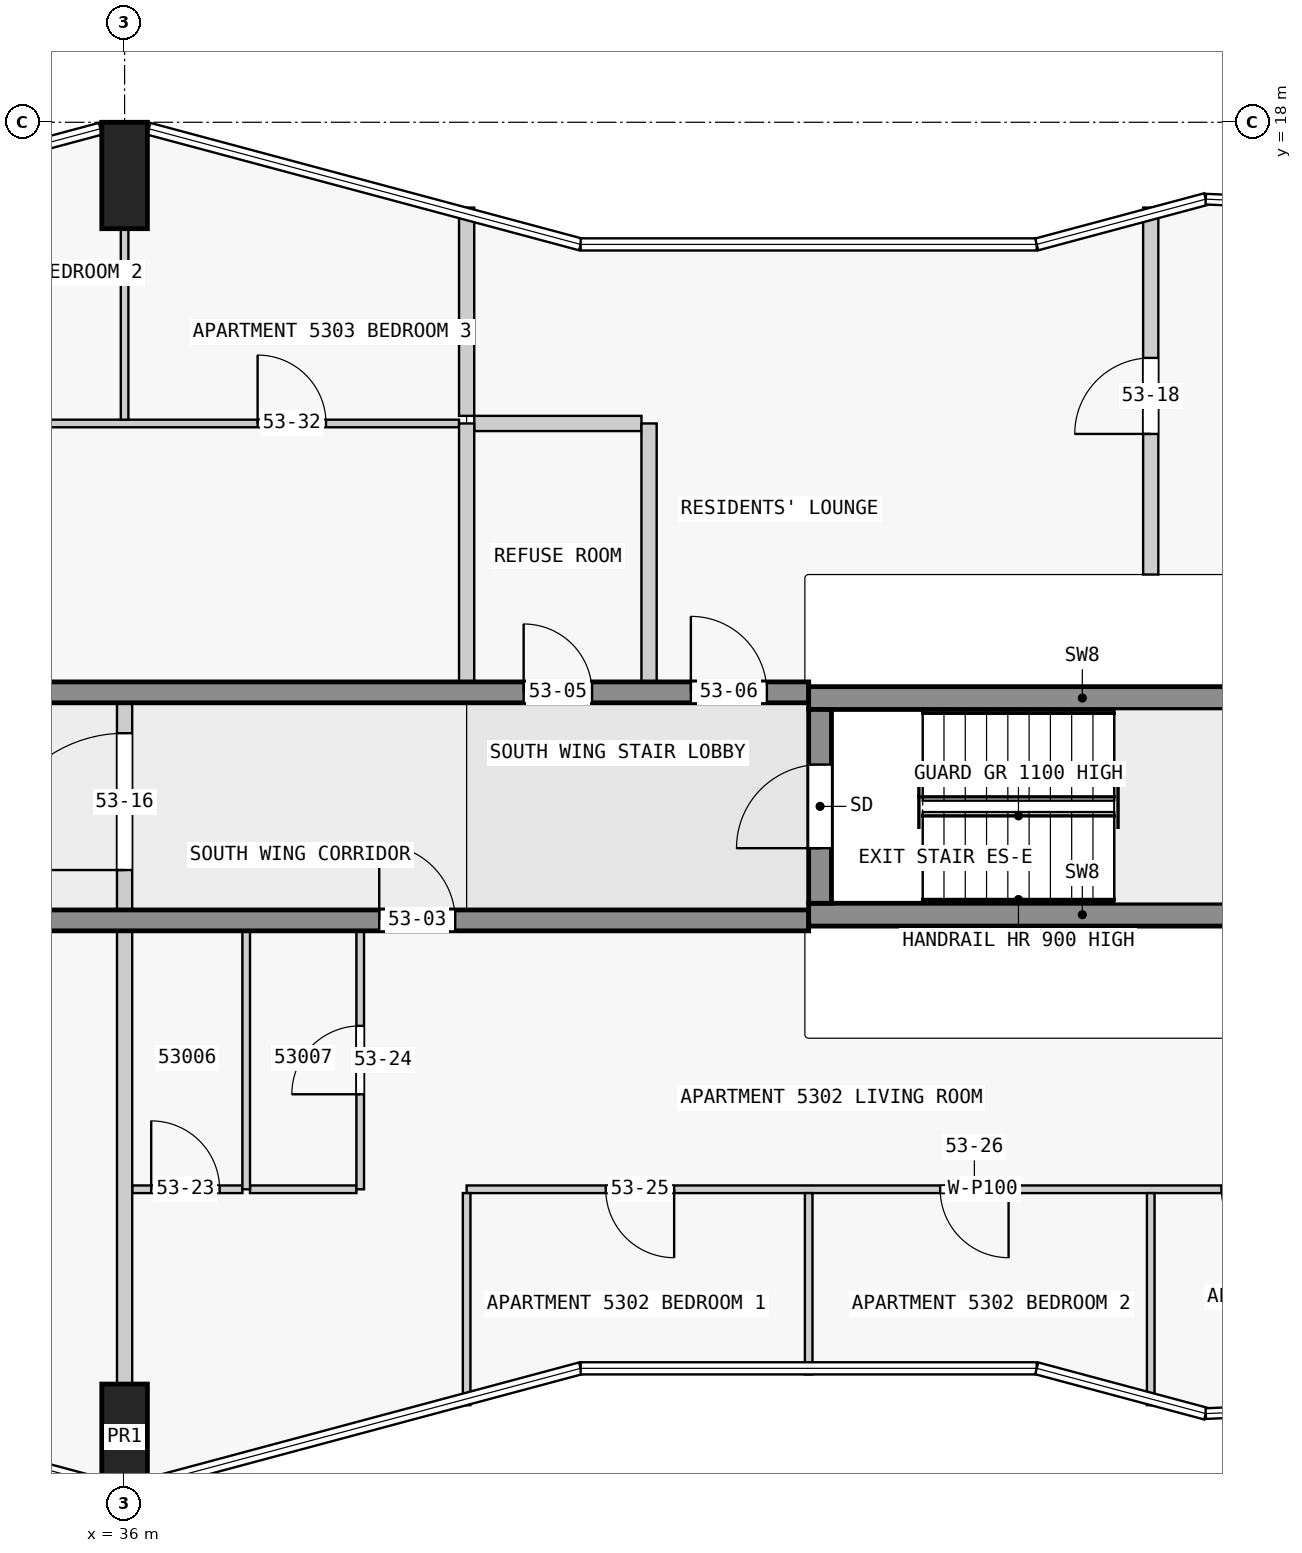
"""IFC4 building model, lengths in metres.
Left out: names, types, materials, properties, quantities, classifications, styles, units other than length and angle.
Written with IfcOpenShell. Run it as: python <this file> out.ifc"""

import sys

from ifc_helpers import new_model, si_unit, direction, frame, frame_2d, origin, origin_2d, place, context, subcontext, project, spatial, rectangle, extrude, element, fill, save


model = new_model("IFC4")
c1 = context("Model", 3, precision=1e-05, world=origin(), true_north=direction((0.0, 1.0)))
c2 = subcontext(c1, "Body", "Model", "MODEL_VIEW")
j1 = project(units=[si_unit("LENGTHUNIT", "METRE"), si_unit("PLANEANGLEUNIT", "RADIAN")], contexts=[c1])
p1 = place(None, origin())
s1 = spatial("IfcSite", under=j1, at=p1, CompositionType="ELEMENT")
p2 = place(p1, origin())
s2 = spatial("IfcBuilding", under=s1, at=p2, CompositionType="ELEMENT")
p3 = place(p2, frame((0.0, 0.0, 204.9)))
s3 = spatial("IfcBuildingStorey", under=s2, at=p3, CompositionType="ELEMENT", Elevation=204.9)
for number, where, z_axis, x_axis in (
    (1, (36.0, 0.7, 0.0), (0.0, 0.0, 1.0), (1.0, 0.0, 0.0)),
    (2, (36.0, 17.3, 0.0), (0.0, 0.0, 1.0), (1.0, 0.0, 0.0)),
):
    element("IfcColumn", number, at=place(p3, frame(where, z_axis=z_axis, x_axis=x_axis)), inside=s3, PredefinedType="COLUMN", context=c2, shape_type="SweptSolid", body=[
        extrude(rectangle(XDim=0.6, YDim=1.4, at=origin_2d()), origin(), (0.0, 0.0, 1.0), 3.5),
    ])
p4 = place(p3, frame((45.15, 7.725, 0.0), z_axis=(0.0, 0.0, 1.0), x_axis=(0.0, 1.0, 0.0)))
e3 = element("IfcWall", 3, at=p4, inside=s3, PredefinedType="SHEAR", context=c2, shape_type="SweptSolid", body=[
    extrude(rectangle(XDim=2.55, YDim=0.3, at=frame_2d((1.275, 0.0))), origin(), (0.0, 0.0, 1.0), 3.5),
])
p5 = place(p4, frame((0.725, 0.0, 0.0)))
e4 = element("IfcOpeningElement", 4, at=p5, cuts=e3, PredefinedType="OPENING", context=c2, shape_type="SweptSolid", body=[
    extrude(rectangle(XDim=1.1, YDim=2.1, at=frame_2d((0.55, 1.05))), frame((0.0, 0.16, 0.0), z_axis=(0.0, -1.0, 0.0), x_axis=(1.0, 0.0, 0.0)), (0.0, 0.0, 1.0), 0.32),
])
for number, where, z_axis, x_axis in (
    (5, (45.0, 7.575, 0.0), (0.0, 0.0, 1.0), (1.0, 0.0, 0.0)),
    (6, (45.0, 10.425, 0.0), (0.0, 0.0, 1.0), (1.0, 0.0, 0.0)),
):
    element("IfcWall", number, at=place(p3, frame(where, z_axis=z_axis, x_axis=x_axis)), inside=s3, PredefinedType="SHEAR", context=c2, shape_type="SweptSolid", body=[
        extrude(rectangle(XDim=7.2, YDim=0.3, at=frame_2d((3.6, 0.0))), origin(), (0.0, 0.0, 1.0), 3.5),
    ])
p6 = place(p3, frame((22.5, 7.5, 0.0), z_axis=(0.0, 0.0, 1.0), x_axis=(1.0, 0.0, 0.0)))
e7 = element("IfcWall", 7, at=p6, inside=s3, PredefinedType="SHEAR", context=c2, shape_type="SweptSolid", body=[
    extrude(rectangle(XDim=22.5, YDim=0.275, at=frame_2d((11.25, 0.0))), origin(), (0.0, 0.0, 1.0), 3.25),
])
p7 = place(p6, frame((4.05, 0.0, 0.0)))
e8 = element("IfcOpeningElement", 8, at=p7, cuts=e7, PredefinedType="OPENING", context=c2, shape_type="SweptSolid", body=[
    extrude(rectangle(XDim=1.0, YDim=2.1, at=frame_2d((0.5, 1.05))), frame((0.0, 0.147, 0.0), z_axis=(0.0, -1.0, 0.0), x_axis=(1.0, 0.0, 0.0)), (0.0, 0.0, 1.0), 0.295),
])
p8 = place(p6, frame((10.35, 0.0, 0.0)))
e9 = element("IfcOpeningElement", 9, at=p8, cuts=e7, PredefinedType="OPENING", context=c2, shape_type="SweptSolid", body=[
    extrude(rectangle(XDim=1.8, YDim=2.1, at=frame_2d((0.9, 1.05))), frame((0.0, 0.147, 0.0), z_axis=(0.0, -1.0, 0.0), x_axis=(1.0, 0.0, 0.0)), (0.0, 0.0, 1.0), 0.295),
])
p9 = place(p6, frame((16.85, 0.0, 0.0)))
e10 = element("IfcOpeningElement", 10, at=p9, cuts=e7, PredefinedType="OPENING", context=c2, shape_type="SweptSolid", body=[
    extrude(rectangle(XDim=1.0, YDim=2.1, at=frame_2d((0.5, 1.05))), frame((0.0, 0.147, 0.0), z_axis=(0.0, -1.0, 0.0), x_axis=(1.0, 0.0, 0.0)), (0.0, 0.0, 1.0), 0.295),
])
p10 = place(p3, frame((22.5, 10.5, 0.0), z_axis=(0.0, 0.0, 1.0), x_axis=(1.0, 0.0, 0.0)))
e11 = element("IfcWall", 11, at=p10, inside=s3, PredefinedType="SHEAR", context=c2, shape_type="SweptSolid", body=[
    extrude(rectangle(XDim=22.5, YDim=0.275, at=frame_2d((11.25, 0.0))), origin(), (0.0, 0.0, 1.0), 3.25),
])
p11 = place(p10, frame((7.75, 0.0, 0.0)))
e12 = element("IfcOpeningElement", 12, at=p11, cuts=e11, PredefinedType="OPENING", context=c2, shape_type="SweptSolid", body=[
    extrude(rectangle(XDim=1.0, YDim=2.1, at=frame_2d((0.5, 1.05))), frame((0.0, 0.147, 0.0), z_axis=(0.0, -1.0, 0.0), x_axis=(1.0, 0.0, 0.0)), (0.0, 0.0, 1.0), 0.295),
])
p12 = place(p10, frame((18.75, 0.0, 0.0)))
e13 = element("IfcOpeningElement", 13, at=p12, cuts=e11, PredefinedType="OPENING", context=c2, shape_type="SweptSolid", body=[
    extrude(rectangle(XDim=0.9, YDim=2.1, at=frame_2d((0.45, 1.05))), frame((0.0, 0.147, 0.0), z_axis=(0.0, -1.0, 0.0), x_axis=(1.0, 0.0, 0.0)), (0.0, 0.0, 1.0), 0.295),
])
p13 = place(p10, frame((20.95, 0.0, 0.0)))
e14 = element("IfcOpeningElement", 14, at=p13, cuts=e11, PredefinedType="OPENING", context=c2, shape_type="SweptSolid", body=[
    extrude(rectangle(XDim=1.0, YDim=2.1, at=frame_2d((0.5, 1.05))), frame((0.0, 0.147, 0.0), z_axis=(0.0, -1.0, 0.0), x_axis=(1.0, 0.0, 0.0)), (0.0, 0.0, 1.0), 0.295),
])
p14 = place(p3, frame((54.08, 3.962, 0.0), z_axis=(0.0, 0.0, 1.0), x_axis=(-1.0, 0.0, 0.0)))
e15 = element("IfcWall", 15, at=p14, inside=s3, PredefinedType="PARTITIONING", context=c2, shape_type="SweptSolid", body=[
    extrude(rectangle(XDim=13.58, YDim=0.1, at=frame_2d((6.79, 0.0))), origin(), (0.0, 0.0, 1.0), 3.25),
])
p15 = place(p14, frame((10.85, 0.0, 0.0)))
e16 = element("IfcOpeningElement", 16, at=p15, cuts=e15, PredefinedType="OPENING", context=c2, shape_type="SweptSolid", body=[
    extrude(rectangle(XDim=0.9, YDim=2.1, at=frame_2d((0.45, 1.05))), frame((0.0, 0.06, 0.0), z_axis=(0.0, -1.0, 0.0), x_axis=(1.0, 0.0, 0.0)), (0.0, 0.0, 1.0), 0.12),
])
p16 = place(p14, frame((6.45, 0.0, 0.0)))
e17 = element("IfcOpeningElement", 17, at=p16, cuts=e15, PredefinedType="OPENING", context=c2, shape_type="SweptSolid", body=[
    extrude(rectangle(XDim=0.9, YDim=2.1, at=frame_2d((0.45, 1.05))), frame((0.0, 0.06, 0.0), z_axis=(0.0, -1.0, 0.0), x_axis=(1.0, 0.0, 0.0)), (0.0, 0.0, 1.0), 0.12),
])
p17 = place(p14, frame((2.75, 0.0, 0.0)))
e18 = element("IfcOpeningElement", 18, at=p17, cuts=e15, PredefinedType="OPENING", context=c2, shape_type="SweptSolid", body=[
    extrude(rectangle(XDim=0.9, YDim=2.1, at=frame_2d((0.45, 1.05))), frame((0.0, 0.06, 0.0), z_axis=(0.0, -1.0, 0.0), x_axis=(1.0, 0.0, 0.0)), (0.0, 0.0, 1.0), 0.12),
])
p18 = place(p3, frame((36.1, 3.962, 0.0), z_axis=(0.0, 0.0, 1.0), x_axis=(1.0, 0.0, 0.0)))
e19 = element("IfcWall", 19, at=p18, inside=s3, PredefinedType="PARTITIONING", context=c2, shape_type="SweptSolid", body=[
    extrude(rectangle(XDim=1.45, YDim=0.1, at=frame_2d((0.725, 0.0))), origin(), (0.0, 0.0, 1.0), 3.25),
])
p19 = place(p18, frame((0.25, 0.0, 0.0)))
e20 = element("IfcOpeningElement", 20, at=p19, cuts=e19, PredefinedType="OPENING", context=c2, shape_type="SweptSolid", body=[
    extrude(rectangle(XDim=0.9, YDim=2.1, at=frame_2d((0.45, 1.05))), frame((0.0, 0.06, 0.0), z_axis=(0.0, -1.0, 0.0), x_axis=(1.0, 0.0, 0.0)), (0.0, 0.0, 1.0), 0.12),
])
p20 = place(p3, frame((37.65, 3.962, 0.0), z_axis=(0.0, 0.0, 1.0), x_axis=(1.0, 0.0, 0.0)))
e21 = element("IfcWall", 21, at=p20, inside=s3, PredefinedType="PARTITIONING", context=c2, shape_type="SweptSolid", body=[
    extrude(rectangle(XDim=1.4, YDim=0.1, at=frame_2d((0.7, 0.0))), origin(), (0.0, 0.0, 1.0), 3.25),
])
p21 = place(p3, frame((27.0, 14.038, 0.0), z_axis=(0.0, 0.0, 1.0), x_axis=(1.0, 0.0, 0.0)))
e22 = element("IfcWall", 22, at=p21, inside=s3, PredefinedType="PARTITIONING", context=c2, shape_type="SweptSolid", body=[
    extrude(rectangle(XDim=13.4, YDim=0.1, at=frame_2d((6.7, 0.0))), origin(), (0.0, 0.0, 1.0), 3.25),
])
p22 = place(p21, frame((1.85, 0.0, 0.0)))
e23 = element("IfcOpeningElement", 23, at=p22, cuts=e22, PredefinedType="OPENING", context=c2, shape_type="SweptSolid", body=[
    extrude(rectangle(XDim=0.9, YDim=2.1, at=frame_2d((0.45, 1.05))), frame((0.0, 0.06, 0.0), z_axis=(0.0, -1.0, 0.0), x_axis=(1.0, 0.0, 0.0)), (0.0, 0.0, 1.0), 0.12),
])
p23 = place(p21, frame((6.35, 0.0, 0.0)))
e24 = element("IfcOpeningElement", 24, at=p23, cuts=e22, PredefinedType="OPENING", context=c2, shape_type="SweptSolid", body=[
    extrude(rectangle(XDim=0.9, YDim=2.1, at=frame_2d((0.45, 1.05))), frame((0.0, 0.06, 0.0), z_axis=(0.0, -1.0, 0.0), x_axis=(1.0, 0.0, 0.0)), (0.0, 0.0, 1.0), 0.12),
])
p24 = place(p21, frame((10.75, 0.0, 0.0)))
e25 = element("IfcOpeningElement", 25, at=p24, cuts=e22, PredefinedType="OPENING", context=c2, shape_type="SweptSolid", body=[
    extrude(rectangle(XDim=0.9, YDim=2.1, at=frame_2d((0.45, 1.05))), frame((0.0, 0.06, 0.0), z_axis=(0.0, -1.0, 0.0), x_axis=(1.0, 0.0, 0.0)), (0.0, 0.0, 1.0), 0.12),
])
p25 = place(p3, frame((42.8, 14.038, 0.0), z_axis=(0.0, 0.0, 1.0), x_axis=(-1.0, 0.0, 0.0)))
e26 = element("IfcWall", 26, at=p25, inside=s3, PredefinedType="PARTITIONING", context=c2, shape_type="SweptSolid", body=[
    extrude(rectangle(XDim=2.2, YDim=0.2, at=frame_2d((1.1, 0.0))), origin(), (0.0, 0.0, 1.0), 3.25),
])
p26 = place(p3, frame((36.0, 14.087, 0.0), z_axis=(0.0, 0.0, 1.0), x_axis=(0.0, 1.0, 0.0)))
e27 = element("IfcWall", 27, at=p26, inside=s3, PredefinedType="PARTITIONING", context=c2, shape_type="SweptSolid", body=[
    extrude(rectangle(XDim=2.513, YDim=0.1, at=frame_2d((1.256, 0.0))), origin(), (0.0, 0.0, 1.0), 3.25),
])
p27 = place(p3, frame((36.0, 1.4, 0.0), z_axis=(0.0, 0.0, 1.0), x_axis=(0.0, 1.0, 0.0)))
e28 = element("IfcWall", 28, at=p27, inside=s3, PredefinedType="PARTITIONING", context=c2, shape_type="SweptSolid", body=[
    extrude(rectangle(XDim=5.963, YDim=0.2, at=frame_2d((2.981, 0.0))), origin(), (0.0, 0.0, 1.0), 3.25),
])
p28 = place(p3, frame((37.6, 3.962, 0.0), z_axis=(0.0, 0.0, 1.0), x_axis=(0.0, 1.0, 0.0)))
e29 = element("IfcWall", 29, at=p28, inside=s3, PredefinedType="PARTITIONING", context=c2, shape_type="SweptSolid", body=[
    extrude(rectangle(XDim=3.4, YDim=0.1, at=frame_2d((1.7, 0.0))), origin(), (0.0, 0.0, 1.0), 3.25),
])
p29 = place(p3, frame((39.1, 3.962, 0.0), z_axis=(0.0, 0.0, 1.0), x_axis=(0.0, 1.0, 0.0)))
e30 = element("IfcWall", 30, at=p29, inside=s3, PredefinedType="PARTITIONING", context=c2, shape_type="SweptSolid", body=[
    extrude(rectangle(XDim=3.4, YDim=0.1, at=frame_2d((1.7, 0.0))), origin(), (0.0, 0.0, 1.0), 3.25),
])
p30 = place(p29, frame((1.25, 0.0, 0.0)))
e31 = element("IfcOpeningElement", 31, at=p30, cuts=e30, PredefinedType="OPENING", context=c2, shape_type="SweptSolid", body=[
    extrude(rectangle(XDim=0.9, YDim=2.1, at=frame_2d((0.45, 1.05))), frame((0.0, 0.06, 0.0), z_axis=(0.0, -1.0, 0.0), x_axis=(1.0, 0.0, 0.0)), (0.0, 0.0, 1.0), 0.12),
])
p31 = place(p3, frame((40.5, 3.913, 0.0), z_axis=(0.0, 0.0, 1.0), x_axis=(0.0, -1.0, 0.0)))
e32 = element("IfcWall", 32, at=p31, inside=s3, PredefinedType="PARTITIONING", context=c2, shape_type="SweptSolid", body=[
    extrude(rectangle(XDim=2.79, YDim=0.1, at=frame_2d((1.395, 0.0))), origin(), (0.0, 0.0, 1.0), 3.25),
])
p32 = place(p3, frame((40.5, 14.038, 0.0), z_axis=(0.0, 0.0, 1.0), x_axis=(0.0, -1.0, 0.0)))
e33 = element("IfcWall", 33, at=p32, inside=s3, PredefinedType="PARTITIONING", context=c2, shape_type="SweptSolid", body=[
    extrude(rectangle(XDim=3.4, YDim=0.2, at=frame_2d((1.7, 0.0))), origin(), (0.0, 0.0, 1.0), 3.25),
])
p33 = place(p3, frame((40.5, 14.137, 0.0), z_axis=(0.0, 0.0, 1.0), x_axis=(0.0, 1.0, 0.0)))
e34 = element("IfcWall", 34, at=p33, inside=s3, PredefinedType="PARTITIONING", context=c2, shape_type="SweptSolid", body=[
    extrude(rectangle(XDim=2.74, YDim=0.2, at=frame_2d((1.37, 0.0))), origin(), (0.0, 0.0, 1.0), 3.25),
])
p34 = place(p3, frame((42.9, 10.637, 0.0), z_axis=(0.0, 0.0, 1.0), x_axis=(0.0, 1.0, 0.0)))
e35 = element("IfcWall", 35, at=p34, inside=s3, PredefinedType="PARTITIONING", context=c2, shape_type="SweptSolid", body=[
    extrude(rectangle(XDim=3.4, YDim=0.2, at=frame_2d((1.7, 0.0))), origin(), (0.0, 0.0, 1.0), 3.25),
])
p35 = place(p3, frame((45.0, 1.527, 0.0), z_axis=(0.0, 0.0, 1.0), x_axis=(0.0, 1.0, 0.0)))
e36 = element("IfcWall", 36, at=p35, inside=s3, PredefinedType="PARTITIONING", context=c2, shape_type="SweptSolid", body=[
    extrude(rectangle(XDim=2.386, YDim=0.1, at=frame_2d((1.193, 0.0))), origin(), (0.0, 0.0, 1.0), 3.25),
])
p36 = place(p3, frame((49.5, 1.122, 0.0), z_axis=(0.0, 0.0, 1.0), x_axis=(0.0, 1.0, 0.0)))
e37 = element("IfcWall", 37, at=p36, inside=s3, PredefinedType="PARTITIONING", context=c2, shape_type="SweptSolid", body=[
    extrude(rectangle(XDim=2.79, YDim=0.1, at=frame_2d((1.395, 0.0))), origin(), (0.0, 0.0, 1.0), 3.25),
])
p37 = place(p3, frame((49.5, 12.05, 0.0), z_axis=(0.0, 0.0, 1.0), x_axis=(0.0, 1.0, 0.0)))
e38 = element("IfcWall", 38, at=p37, inside=s3, PredefinedType="PARTITIONING", context=c2, shape_type="SweptSolid", body=[
    extrude(rectangle(XDim=4.828, YDim=0.2, at=frame_2d((2.414, 0.0))), origin(), (0.0, 0.0, 1.0), 3.25),
])
p38 = place(p37, frame((1.85, 0.0, 0.0)))
e39 = element("IfcOpeningElement", 39, at=p38, cuts=e38, PredefinedType="OPENING", context=c2, shape_type="SweptSolid", body=[
    extrude(rectangle(XDim=1.0, YDim=2.1, at=frame_2d((0.5, 1.05))), frame((0.0, 0.11, 0.0), z_axis=(0.0, -1.0, 0.0), x_axis=(1.0, 0.0, 0.0)), (0.0, 0.0, 1.0), 0.22),
])
p39 = place(p3, frame((36.0, 7.462, 0.0), z_axis=(0.0, 0.0, 1.0), x_axis=(0.0, 1.0, 0.0)))
e40 = element("IfcWall", 40, at=p39, inside=s3, PredefinedType="PARTITIONING", context=c2, shape_type="SweptSolid", body=[
    extrude(rectangle(XDim=3.175, YDim=0.2, at=frame_2d((1.587, 0.0))), origin(), (0.0, 0.0, 1.0), 3.25),
])
p40 = place(p39, frame((0.7, 0.0, 0.0)))
e41 = element("IfcOpeningElement", 41, at=p40, cuts=e40, PredefinedType="OPENING", context=c2, shape_type="SweptSolid", body=[
    extrude(rectangle(XDim=1.8, YDim=2.1, at=frame_2d((0.9, 1.05))), frame((0.0, 0.11, 0.0), z_axis=(0.0, -1.0, 0.0), x_axis=(1.0, 0.0, 0.0)), (0.0, 0.0, 1.0), 0.22),
])
p41 = place(p5, origin())
e42 = element("IfcDoor", 42, at=p41, inside=s3, OperationType="SINGLE_SWING_LEFT", PredefinedType="DOOR", context=c2, shape_type="SweptSolid", body=[
    extrude(rectangle(XDim=1.1, YDim=2.1, at=frame_2d((0.55, 1.05))), frame((0.0, 0.025, 0.0), z_axis=(0.0, -1.0, 0.0), x_axis=(1.0, 0.0, 0.0)), (0.0, 0.0, 1.0), 0.05),
])
fill(e4, e42)
p42 = place(p9, origin())
e43 = element("IfcDoor", 43, at=p42, inside=s3, OperationType="SINGLE_SWING_RIGHT", PredefinedType="DOOR", context=c2, shape_type="SweptSolid", body=[
    extrude(rectangle(XDim=1.0, YDim=2.1, at=frame_2d((0.5, 1.05))), frame((0.0, 0.025, 0.0), z_axis=(0.0, -1.0, 0.0), x_axis=(1.0, 0.0, 0.0)), (0.0, 0.0, 1.0), 0.05),
])
fill(e10, e43)
p43 = place(p12, origin())
e44 = element("IfcDoor", 44, at=p43, inside=s3, OperationType="SINGLE_SWING_RIGHT", PredefinedType="DOOR", context=c2, shape_type="SweptSolid", body=[
    extrude(rectangle(XDim=0.9, YDim=2.1, at=frame_2d((0.45, 1.05))), frame((0.0, 0.025, 0.0), z_axis=(0.0, -1.0, 0.0), x_axis=(1.0, 0.0, 0.0)), (0.0, 0.0, 1.0), 0.05),
])
fill(e13, e44)
p44 = place(p13, origin())
e45 = element("IfcDoor", 45, at=p44, inside=s3, OperationType="SINGLE_SWING_RIGHT", PredefinedType="DOOR", context=c2, shape_type="SweptSolid", body=[
    extrude(rectangle(XDim=1.0, YDim=2.1, at=frame_2d((0.5, 1.05))), frame((0.0, 0.025, 0.0), z_axis=(0.0, -1.0, 0.0), x_axis=(1.0, 0.0, 0.0)), (0.0, 0.0, 1.0), 0.05),
])
fill(e14, e45)
p45 = place(p40, origin())
e46 = element("IfcDoor", 46, at=p45, inside=s3, OperationType="SINGLE_SWING_RIGHT", PredefinedType="DOOR", context=c2, shape_type="SweptSolid", body=[
    extrude(rectangle(XDim=1.8, YDim=2.1, at=frame_2d((0.9, 1.05))), frame((0.0, 0.025, 0.0), z_axis=(0.0, -1.0, 0.0), x_axis=(1.0, 0.0, 0.0)), (0.0, 0.0, 1.0), 0.05),
])
fill(e41, e46)
p46 = place(p38, origin())
e47 = element("IfcDoor", 47, at=p46, inside=s3, OperationType="SINGLE_SWING_LEFT", PredefinedType="DOOR", context=c2, shape_type="SweptSolid", body=[
    extrude(rectangle(XDim=1.0, YDim=2.1, at=frame_2d((0.5, 1.05))), frame((0.0, 0.025, 0.0), z_axis=(0.0, -1.0, 0.0), x_axis=(1.0, 0.0, 0.0)), (0.0, 0.0, 1.0), 0.05),
])
fill(e39, e47)
p47 = place(p19, origin())
e48 = element("IfcDoor", 48, at=p47, inside=s3, OperationType="SINGLE_SWING_LEFT", PredefinedType="DOOR", context=c2, shape_type="SweptSolid", body=[
    extrude(rectangle(XDim=0.9, YDim=2.1, at=frame_2d((0.45, 1.05))), frame((0.0, 0.025, 0.0), z_axis=(0.0, -1.0, 0.0), x_axis=(1.0, 0.0, 0.0)), (0.0, 0.0, 1.0), 0.05),
])
fill(e20, e48)
p48 = place(p30, origin())
e49 = element("IfcDoor", 49, at=p48, inside=s3, OperationType="SINGLE_SWING_LEFT", PredefinedType="DOOR", context=c2, shape_type="SweptSolid", body=[
    extrude(rectangle(XDim=0.9, YDim=2.1, at=frame_2d((0.45, 1.05))), frame((0.0, 0.025, 0.0), z_axis=(0.0, -1.0, 0.0), x_axis=(1.0, 0.0, 0.0)), (0.0, 0.0, 1.0), 0.05),
])
fill(e31, e49)
p49 = place(p15, origin())
e50 = element("IfcDoor", 50, at=p49, inside=s3, OperationType="SINGLE_SWING_RIGHT", PredefinedType="DOOR", context=c2, shape_type="SweptSolid", body=[
    extrude(rectangle(XDim=0.9, YDim=2.1, at=frame_2d((0.45, 1.05))), frame((0.0, 0.025, 0.0), z_axis=(0.0, -1.0, 0.0), x_axis=(1.0, 0.0, 0.0)), (0.0, 0.0, 1.0), 0.05),
])
fill(e16, e50)
p50 = place(p16, origin())
e51 = element("IfcDoor", 51, at=p50, inside=s3, OperationType="SINGLE_SWING_RIGHT", PredefinedType="DOOR", context=c2, shape_type="SweptSolid", body=[
    extrude(rectangle(XDim=0.9, YDim=2.1, at=frame_2d((0.45, 1.05))), frame((0.0, 0.025, 0.0), z_axis=(0.0, -1.0, 0.0), x_axis=(1.0, 0.0, 0.0)), (0.0, 0.0, 1.0), 0.05),
])
fill(e17, e51)
p51 = place(p17, origin())
e52 = element("IfcDoor", 52, at=p51, inside=s3, OperationType="SINGLE_SWING_LEFT", PredefinedType="DOOR", context=c2, shape_type="SweptSolid", body=[
    extrude(rectangle(XDim=0.9, YDim=2.1, at=frame_2d((0.45, 1.05))), frame((0.0, 0.025, 0.0), z_axis=(0.0, -1.0, 0.0), x_axis=(1.0, 0.0, 0.0)), (0.0, 0.0, 1.0), 0.05),
])
fill(e18, e52)
p52 = place(p24, origin())
e53 = element("IfcDoor", 53, at=p52, inside=s3, OperationType="SINGLE_SWING_RIGHT", PredefinedType="DOOR", context=c2, shape_type="SweptSolid", body=[
    extrude(rectangle(XDim=0.9, YDim=2.1, at=frame_2d((0.45, 1.05))), frame((0.0, 0.025, 0.0), z_axis=(0.0, -1.0, 0.0), x_axis=(1.0, 0.0, 0.0)), (0.0, 0.0, 1.0), 0.05),
])
fill(e25, e53)
save(model, sys.argv[1])
